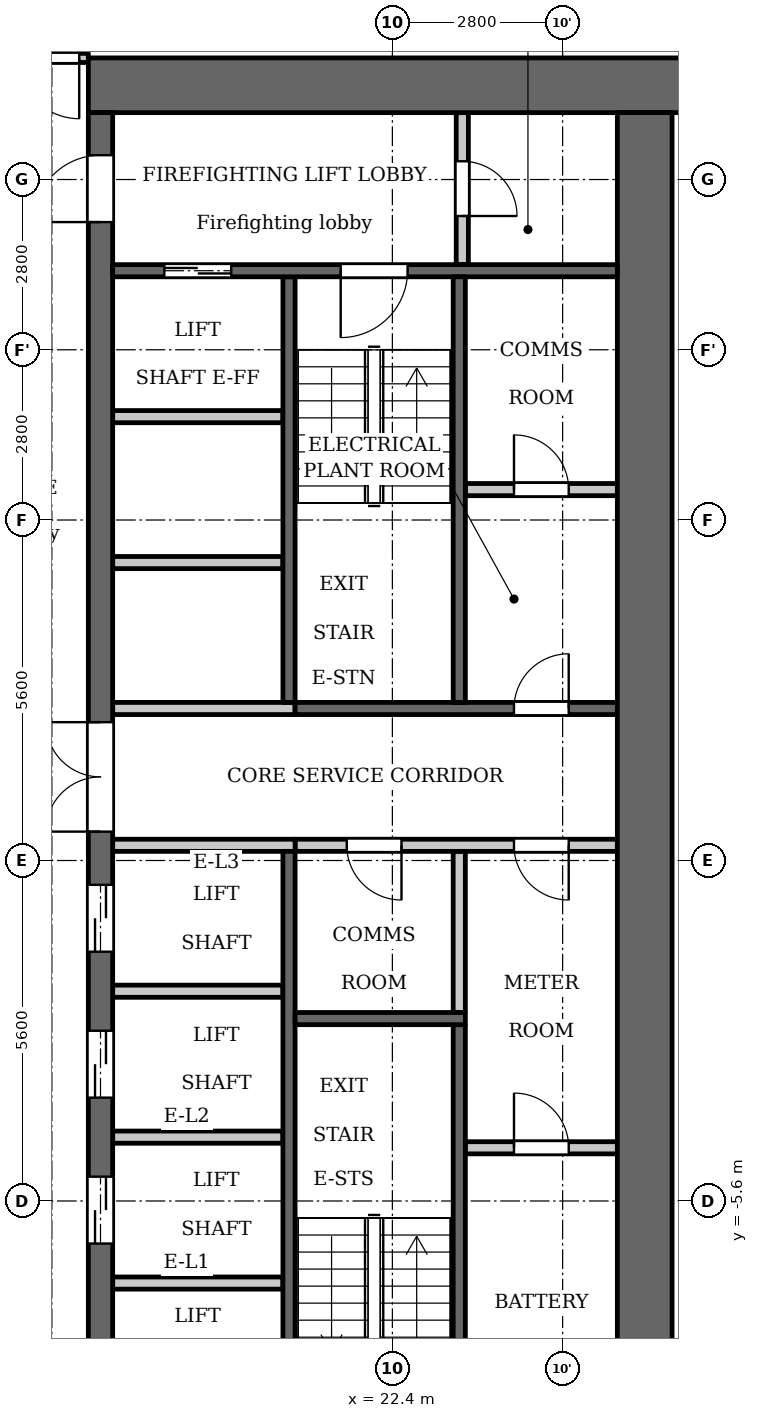
"""IFC4 building model, lengths in metres.
Left out: names, types, materials, properties, quantities, classifications, styles, units other than length and angle.
Written with IfcOpenShell. Run it as: python <this file> out.ifc"""

import sys

from ifc_helpers import new_model, si_unit, direction, frame, frame_2d, origin, place, context, subcontext, project, spatial, rectangle, extrude, element, fill, save


model = new_model("IFC4")
c1 = context("Model", 3, precision=1e-05, world=origin(), true_north=direction((0.0, 1.0)))
c2 = subcontext(c1, "Body", "Model", "MODEL_VIEW")
j1 = project(units=[si_unit("LENGTHUNIT", "METRE"), si_unit("PLANEANGLEUNIT", "RADIAN")], contexts=[c1])
p1 = place(None, origin())
s1 = spatial("IfcSite", under=j1, at=p1, CompositionType="ELEMENT")
p2 = place(p1, origin())
s2 = spatial("IfcBuilding", under=s1, at=p2, CompositionType="ELEMENT")
p3 = place(p2, frame((0.0, 0.0, 121.8)))
s3 = spatial("IfcBuildingStorey", under=s2, at=p3, CompositionType="ELEMENT", Elevation=121.8)
p4 = place(p3, frame((23.5, -2.5, 0.0), z_axis=(0.0, 0.0, 1.0), x_axis=(0.0, 1.0, 0.0)))
e1 = element("IfcWall", 1, at=p4, inside=s3, PredefinedType="PARTITIONING", context=c2, shape_type="SweptSolid", body=[
    extrude(rectangle(XDim=2.65, YDim=0.2, at=frame_2d((1.325, 0.0))), origin(), (0.0, 0.0, 1.0), 3.15),
])
p5 = place(p3, frame((20.7, 2.6, 0.0), z_axis=(0.0, 0.0, 1.0), x_axis=(0.0, 1.0, 0.0)))
e2 = element("IfcWall", 2, at=p5, inside=s3, PredefinedType="SHEAR", context=c2, shape_type="SweptSolid", body=[
    extrude(rectangle(XDim=7.0, YDim=0.2, at=frame_2d((3.5, 0.0))), origin(), (0.0, 0.0, 1.0), 3.15),
])
p6 = place(p3, frame((20.7, -9.6, 0.0), z_axis=(0.0, 0.0, 1.0), x_axis=(0.0, 1.0, 0.0)))
e3 = element("IfcWall", 3, at=p6, inside=s3, PredefinedType="SHEAR", context=c2, shape_type="SweptSolid", body=[
    extrude(rectangle(XDim=9.75, YDim=0.2, at=frame_2d((4.875, 0.0))), origin(), (0.0, 0.0, 1.0), 3.15),
])
p7 = place(p3, frame((20.8, 2.5, 0.0), z_axis=(0.0, 0.0, 1.0), x_axis=(1.0, 0.0, 0.0)))
e4 = element("IfcWall", 4, at=p7, inside=s3, PredefinedType="SHEAR", context=c2, shape_type="SweptSolid", body=[
    extrude(rectangle(XDim=5.3, YDim=0.2, at=frame_2d((2.65, 0.0))), origin(), (0.0, 0.0, 1.0), 3.15),
])
p8 = place(p7, frame((3.6, 0.0, 0.0)))
e5 = element("IfcOpeningElement", 5, at=p8, cuts=e4, PredefinedType="OPENING", context=c2, shape_type="SweptSolid", body=[
    extrude(rectangle(XDim=0.9, YDim=2.1, at=frame_2d((0.45, 1.05))), frame((0.0, 0.11, 0.0), z_axis=(0.0, -1.0, 0.0), x_axis=(1.0, 0.0, 0.0)), (0.0, 0.0, 1.0), 0.22),
])
p9 = place(p3, frame((20.8, 0.25, 0.0), z_axis=(0.0, 0.0, 1.0), x_axis=(1.0, 0.0, 0.0)))
e6 = element("IfcWall", 6, at=p9, inside=s3, PredefinedType="PARTITIONING", context=c2, shape_type="SweptSolid", body=[
    extrude(rectangle(XDim=5.3, YDim=0.2, at=frame_2d((2.65, 0.0))), origin(), (0.0, 0.0, 1.0), 3.15),
])
p10 = place(p9, frame((0.85, 0.0, 0.0)))
e7 = element("IfcOpeningElement", 7, at=p10, cuts=e6, PredefinedType="OPENING", context=c2, shape_type="SweptSolid", body=[
    extrude(rectangle(XDim=0.9, YDim=2.1, at=frame_2d((0.45, 1.05))), frame((0.0, 0.11, 0.0), z_axis=(0.0, -1.0, 0.0), x_axis=(1.0, 0.0, 0.0)), (0.0, 0.0, 1.0), 0.22),
])
p11 = place(p9, frame((3.6, 0.0, 0.0)))
e8 = element("IfcOpeningElement", 8, at=p11, cuts=e6, PredefinedType="OPENING", context=c2, shape_type="SweptSolid", body=[
    extrude(rectangle(XDim=0.9, YDim=2.1, at=frame_2d((0.45, 1.05))), frame((0.0, 0.11, 0.0), z_axis=(0.0, -1.0, 0.0), x_axis=(1.0, 0.0, 0.0)), (0.0, 0.0, 1.0), 0.22),
])
p12 = place(p3, frame((17.4, 12.75, 0.0), z_axis=(0.0, 0.0, 1.0), x_axis=(1.0, 0.0, 0.0)))
e9 = element("IfcWall", 9, at=p12, inside=s3, PredefinedType="SHEAR", context=c2, shape_type="SweptSolid", body=[
    extrude(rectangle(XDim=10.4, YDim=0.9, at=frame_2d((5.2, 0.0))), origin(), (0.0, 0.0, 1.0), 3.15),
])
p13 = place(p3, frame((17.6, -12.3, 0.0), z_axis=(0.0, 0.0, 1.0), x_axis=(0.0, 1.0, 0.0)))
e10 = element("IfcWall", 10, at=p13, inside=s3, PredefinedType="SHEAR", context=c2, shape_type="SweptSolid", body=[
    extrude(rectangle(XDim=24.6, YDim=0.4, at=frame_2d((12.3, 0.0))), origin(), (0.0, 0.0, 1.0), 3.15),
])
p14 = place(p13, frame((6.0, 0.0, 0.0)))
e11 = element("IfcOpeningElement", 11, at=p14, cuts=e10, PredefinedType="OPENING", context=c2, shape_type="SweptSolid", body=[
    extrude(rectangle(XDim=1.1, YDim=2.1, at=frame_2d((0.55, 1.05))), frame((0.0, 0.21, 0.0), z_axis=(0.0, -1.0, 0.0), x_axis=(1.0, 0.0, 0.0)), (0.0, 0.0, 1.0), 0.42),
])
p15 = place(p13, frame((8.4, 0.0, 0.0)))
e12 = element("IfcOpeningElement", 12, at=p15, cuts=e10, PredefinedType="OPENING", context=c2, shape_type="SweptSolid", body=[
    extrude(rectangle(XDim=1.1, YDim=2.1, at=frame_2d((0.55, 1.05))), frame((0.0, 0.21, 0.0), z_axis=(0.0, -1.0, 0.0), x_axis=(1.0, 0.0, 0.0)), (0.0, 0.0, 1.0), 0.42),
])
p16 = place(p13, frame((10.8, 0.0, 0.0)))
e13 = element("IfcOpeningElement", 13, at=p16, cuts=e10, PredefinedType="OPENING", context=c2, shape_type="SweptSolid", body=[
    extrude(rectangle(XDim=1.1, YDim=2.1, at=frame_2d((0.55, 1.05))), frame((0.0, 0.21, 0.0), z_axis=(0.0, -1.0, 0.0), x_axis=(1.0, 0.0, 0.0)), (0.0, 0.0, 1.0), 0.42),
])
p17 = place(p13, frame((22.8, 0.0, 0.0)))
e14 = element("IfcOpeningElement", 14, at=p17, cuts=e10, PredefinedType="OPENING", context=c2, shape_type="SweptSolid", body=[
    extrude(rectangle(XDim=1.1, YDim=2.1, at=frame_2d((0.55, 1.05))), frame((0.0, 0.21, 0.0), z_axis=(0.0, -1.0, 0.0), x_axis=(1.0, 0.0, 0.0)), (0.0, 0.0, 1.0), 0.42),
])
p18 = place(p13, frame((0.7, 0.0, 0.0)))
e15 = element("IfcOpeningElement", 15, at=p18, cuts=e10, PredefinedType="OPENING", context=c2, shape_type="SweptSolid", body=[
    extrude(rectangle(XDim=1.1, YDim=2.1, at=frame_2d((0.55, 1.05))), frame((0.0, 0.21, 0.0), z_axis=(0.0, -1.0, 0.0), x_axis=(1.0, 0.0, 0.0)), (0.0, 0.0, 1.0), 0.42),
])
p19 = place(p13, frame((12.775, 0.0, 0.0)))
e16 = element("IfcOpeningElement", 16, at=p19, cuts=e10, PredefinedType="OPENING", context=c2, shape_type="SweptSolid", body=[
    extrude(rectangle(XDim=1.8, YDim=2.1, at=frame_2d((0.9, 1.05))), frame((0.0, 0.21, 0.0), z_axis=(0.0, -1.0, 0.0), x_axis=(1.0, 0.0, 0.0)), (0.0, 0.0, 1.0), 0.42),
])
p20 = place(p3, frame((26.55, -12.3, 0.0), z_axis=(0.0, 0.0, 1.0), x_axis=(0.0, 1.0, 0.0)))
e17 = element("IfcWall", 17, at=p20, inside=s3, PredefinedType="SHEAR", context=c2, shape_type="SweptSolid", body=[
    extrude(rectangle(XDim=24.6, YDim=0.9, at=frame_2d((12.3, 0.0))), origin(), (0.0, 0.0, 1.0), 3.15),
])
p21 = place(p3, frame((23.55, 9.8, 0.0), z_axis=(0.0, 0.0, 1.0), x_axis=(0.0, 1.0, 0.0)))
e18 = element("IfcWall", 18, at=p21, inside=s3, PredefinedType="PARTITIONING", context=c2, shape_type="SweptSolid", body=[
    extrude(rectangle(XDim=2.5, YDim=0.2, at=frame_2d((1.25, 0.0))), origin(), (0.0, 0.0, 1.0), 3.15),
])
p22 = place(p21, frame((0.8, 0.0, 0.0)))
e19 = element("IfcOpeningElement", 19, at=p22, cuts=e18, PredefinedType="OPENING", context=c2, shape_type="SweptSolid", body=[
    extrude(rectangle(XDim=0.9, YDim=2.1, at=frame_2d((0.45, 1.05))), frame((0.0, 0.11, 0.0), z_axis=(0.0, -1.0, 0.0), x_axis=(1.0, 0.0, 0.0)), (0.0, 0.0, 1.0), 0.22),
])
p23 = place(p3, frame((23.6, -4.725, 0.0), z_axis=(0.0, 0.0, 1.0), x_axis=(1.0, 0.0, 0.0)))
e20 = element("IfcWall", 20, at=p23, inside=s3, PredefinedType="PARTITIONING", context=c2, shape_type="SweptSolid", body=[
    extrude(rectangle(XDim=2.5, YDim=0.2, at=frame_2d((1.25, 0.0))), origin(), (0.0, 0.0, 1.0), 3.15),
])
p24 = place(p23, frame((0.8, 0.0, 0.0)))
e21 = element("IfcOpeningElement", 21, at=p24, cuts=e20, PredefinedType="OPENING", context=c2, shape_type="SweptSolid", body=[
    extrude(rectangle(XDim=0.9, YDim=2.1, at=frame_2d((0.45, 1.05))), frame((0.0, 0.11, 0.0), z_axis=(0.0, -1.0, 0.0), x_axis=(1.0, 0.0, 0.0)), (0.0, 0.0, 1.0), 0.22),
])
p25 = place(p3, frame((23.6, 6.1, 0.0), z_axis=(0.0, 0.0, 1.0), x_axis=(1.0, 0.0, 0.0)))
e22 = element("IfcWall", 22, at=p25, inside=s3, PredefinedType="PARTITIONING", context=c2, shape_type="SweptSolid", body=[
    extrude(rectangle(XDim=2.5, YDim=0.2, at=frame_2d((1.25, 0.0))), origin(), (0.0, 0.0, 1.0), 3.15),
])
p26 = place(p25, frame((0.8, 0.0, 0.0)))
e23 = element("IfcOpeningElement", 23, at=p26, cuts=e22, PredefinedType="OPENING", context=c2, shape_type="SweptSolid", body=[
    extrude(rectangle(XDim=0.9, YDim=2.1, at=frame_2d((0.45, 1.05))), frame((0.0, 0.11, 0.0), z_axis=(0.0, -1.0, 0.0), x_axis=(1.0, 0.0, 0.0)), (0.0, 0.0, 1.0), 0.22),
])
for number, where, z_axis, x_axis in (
    (24, (17.8, -6.95, 0.0), (0.0, 0.0, 1.0), (1.0, 0.0, 0.0)),
    (25, (17.8, -4.55, 0.0), (0.0, 0.0, 1.0), (1.0, 0.0, 0.0)),
    (26, (17.8, -2.15, 0.0), (0.0, 0.0, 1.0), (1.0, 0.0, 0.0)),
):
    element("IfcWall", number, at=place(p3, frame(where, z_axis=z_axis, x_axis=x_axis)), inside=s3, PredefinedType="PARTITIONING", context=c2, shape_type="SweptSolid", body=[
        extrude(rectangle(XDim=2.8, YDim=0.2, at=frame_2d((1.4, 0.0))), origin(), (0.0, 0.0, 1.0), 3.15),
    ])
for number, where, z_axis, x_axis in (
    (27, (17.8, 0.25, 0.0), (0.0, 0.0, 1.0), (1.0, 0.0, 0.0)),
    (28, (17.8, 2.5, 0.0), (0.0, 0.0, 1.0), (1.0, 0.0, 0.0)),
):
    element("IfcWall", number, at=place(p3, frame(where, z_axis=z_axis, x_axis=x_axis)), inside=s3, PredefinedType="PARTITIONING", context=c2, shape_type="SweptSolid", body=[
        extrude(rectangle(XDim=3.0, YDim=0.2, at=frame_2d((1.5, 0.0))), origin(), (0.0, 0.0, 1.0), 3.15),
    ])
for number, where, z_axis, x_axis in (
    (29, (17.8, 4.9, 0.0), (0.0, 0.0, 1.0), (1.0, 0.0, 0.0)),
    (30, (17.8, 7.3, 0.0), (0.0, 0.0, 1.0), (1.0, 0.0, 0.0)),
):
    element("IfcWall", number, at=place(p3, frame(where, z_axis=z_axis, x_axis=x_axis)), inside=s3, PredefinedType="PARTITIONING", context=c2, shape_type="SweptSolid", body=[
        extrude(rectangle(XDim=2.8, YDim=0.2, at=frame_2d((1.4, 0.0))), origin(), (0.0, 0.0, 1.0), 3.15),
    ])
p27 = place(p3, frame((17.8, 9.7, 0.0), z_axis=(0.0, 0.0, 1.0), x_axis=(1.0, 0.0, 0.0)))
e31 = element("IfcWall", 31, at=p27, inside=s3, PredefinedType="SHEAR", context=c2, shape_type="SweptSolid", body=[
    extrude(rectangle(XDim=8.3, YDim=0.2, at=frame_2d((4.15, 0.0))), origin(), (0.0, 0.0, 1.0), 3.15),
])
p28 = place(p27, frame((0.85, 0.0, 0.0)))
e32 = element("IfcOpeningElement", 32, at=p28, cuts=e31, PredefinedType="OPENING", context=c2, shape_type="SweptSolid", body=[
    extrude(rectangle(XDim=1.1, YDim=2.1, at=frame_2d((0.55, 1.05))), frame((0.0, 0.11, 0.0), z_axis=(0.0, -1.0, 0.0), x_axis=(1.0, 0.0, 0.0)), (0.0, 0.0, 1.0), 0.22),
])
p29 = place(p27, frame((3.75, 0.0, 0.0)))
e33 = element("IfcOpeningElement", 33, at=p29, cuts=e31, PredefinedType="OPENING", context=c2, shape_type="SweptSolid", body=[
    extrude(rectangle(XDim=1.1, YDim=2.1, at=frame_2d((0.55, 1.05))), frame((0.0, 0.11, 0.0), z_axis=(0.0, -1.0, 0.0), x_axis=(1.0, 0.0, 0.0)), (0.0, 0.0, 1.0), 0.22),
])
p30 = place(p3, frame((23.5, 2.6, 0.0), z_axis=(0.0, 0.0, 1.0), x_axis=(0.0, 1.0, 0.0)))
e34 = element("IfcWall", 34, at=p30, inside=s3, PredefinedType="SHEAR", context=c2, shape_type="SweptSolid", body=[
    extrude(rectangle(XDim=7.0, YDim=0.2, at=frame_2d((3.5, 0.0))), origin(), (0.0, 0.0, 1.0), 3.15),
])
p31 = place(p3, frame((23.5, -9.6, 0.0), z_axis=(0.0, 0.0, 1.0), x_axis=(0.0, 1.0, 0.0)))
e35 = element("IfcWall", 35, at=p31, inside=s3, PredefinedType="SHEAR", context=c2, shape_type="SweptSolid", body=[
    extrude(rectangle(XDim=6.9, YDim=0.2, at=frame_2d((3.45, 0.0))), origin(), (0.0, 0.0, 1.0), 3.15),
])
p32 = place(p3, frame((20.8, -2.6, 0.0), z_axis=(0.0, 0.0, 1.0), x_axis=(1.0, 0.0, 0.0)))
e36 = element("IfcWall", 36, at=p32, inside=s3, PredefinedType="SHEAR", context=c2, shape_type="SweptSolid", body=[
    extrude(rectangle(XDim=2.8, YDim=0.2, at=frame_2d((1.4, 0.0))), origin(), (0.0, 0.0, 1.0), 3.15),
])
p33 = place(p3, frame((-17.4, 13.2, 0.0), z_axis=(0.0, 0.0, 1.0), x_axis=(1.0, 0.0, 0.0)))
e37 = element("IfcWall", 37, at=p33, inside=s3, PredefinedType="PARTITIONING", context=c2, shape_type="SweptSolid", body=[
    extrude(rectangle(XDim=34.8, YDim=0.15, at=frame_2d((17.4, 0.0))), origin(), (0.0, 0.0, 1.0), 3.15),
])
p34 = place(p33, frame((0.25, 0.0, 0.0)))
e38 = element("IfcOpeningElement", 38, at=p34, cuts=e37, PredefinedType="OPENING", context=c2, shape_type="SweptSolid", body=[
    extrude(rectangle(XDim=1.0, YDim=2.1, at=frame_2d((0.5, 1.05))), frame((0.0, 0.085, 0.0), z_axis=(0.0, -1.0, 0.0), x_axis=(1.0, 0.0, 0.0)), (0.0, 0.0, 1.0), 0.17),
])
p35 = place(p33, frame((33.65, 0.0, 0.0)))
e39 = element("IfcOpeningElement", 39, at=p35, cuts=e37, PredefinedType="OPENING", context=c2, shape_type="SweptSolid", body=[
    extrude(rectangle(XDim=1.0, YDim=2.1, at=frame_2d((0.5, 1.05))), frame((0.0, 0.085, 0.0), z_axis=(0.0, -1.0, 0.0), x_axis=(1.0, 0.0, 0.0)), (0.0, 0.0, 1.0), 0.17),
])
p36 = place(p33, frame((15.75, 0.0, 0.0)))
e40 = element("IfcOpeningElement", 40, at=p36, cuts=e37, PredefinedType="OPENING", context=c2, shape_type="SweptSolid", body=[
    extrude(rectangle(XDim=1.0, YDim=2.1, at=frame_2d((0.5, 1.05))), frame((0.0, 0.085, 0.0), z_axis=(0.0, -1.0, 0.0), x_axis=(1.0, 0.0, 0.0)), (0.0, 0.0, 1.0), 0.17),
])
p37 = place(p33, frame((18.1, 0.0, 0.0)))
e41 = element("IfcOpeningElement", 41, at=p37, cuts=e37, PredefinedType="OPENING", context=c2, shape_type="SweptSolid", body=[
    extrude(rectangle(XDim=1.0, YDim=2.1, at=frame_2d((0.5, 1.05))), frame((0.0, 0.085, 0.0), z_axis=(0.0, -1.0, 0.0), x_axis=(1.0, 0.0, 0.0)), (0.0, 0.0, 1.0), 0.17),
])
p38 = place(p33, frame((23.55, 0.0, 0.0)))
e42 = element("IfcOpeningElement", 42, at=p38, cuts=e37, PredefinedType="OPENING", context=c2, shape_type="SweptSolid", body=[
    extrude(rectangle(XDim=1.0, YDim=2.1, at=frame_2d((0.5, 1.05))), frame((0.0, 0.085, 0.0), z_axis=(0.0, -1.0, 0.0), x_axis=(1.0, 0.0, 0.0)), (0.0, 0.0, 1.0), 0.17),
])
p39 = place(p14, origin())
e43 = element("IfcDoor", 43, at=p39, inside=s3, OperationType="DOUBLE_DOOR_SLIDING", PredefinedType="DOOR", context=c2, shape_type="SweptSolid", body=[
    extrude(rectangle(XDim=1.1, YDim=2.1, at=frame_2d((0.55, 1.05))), frame((0.0, 0.025, 0.0), z_axis=(0.0, -1.0, 0.0), x_axis=(1.0, 0.0, 0.0)), (0.0, 0.0, 1.0), 0.05),
])
fill(e11, e43)
p40 = place(p15, origin())
e44 = element("IfcDoor", 44, at=p40, inside=s3, OperationType="DOUBLE_DOOR_SLIDING", PredefinedType="DOOR", context=c2, shape_type="SweptSolid", body=[
    extrude(rectangle(XDim=1.1, YDim=2.1, at=frame_2d((0.55, 1.05))), frame((0.0, 0.025, 0.0), z_axis=(0.0, -1.0, 0.0), x_axis=(1.0, 0.0, 0.0)), (0.0, 0.0, 1.0), 0.05),
])
fill(e12, e44)
p41 = place(p16, origin())
e45 = element("IfcDoor", 45, at=p41, inside=s3, OperationType="DOUBLE_DOOR_SLIDING", PredefinedType="DOOR", context=c2, shape_type="SweptSolid", body=[
    extrude(rectangle(XDim=1.1, YDim=2.1, at=frame_2d((0.55, 1.05))), frame((0.0, 0.025, 0.0), z_axis=(0.0, -1.0, 0.0), x_axis=(1.0, 0.0, 0.0)), (0.0, 0.0, 1.0), 0.05),
])
fill(e13, e45)
p42 = place(p28, origin())
e46 = element("IfcDoor", 46, at=p42, inside=s3, OperationType="DOUBLE_DOOR_SLIDING", PredefinedType="DOOR", context=c2, shape_type="SweptSolid", body=[
    extrude(rectangle(XDim=1.1, YDim=2.1, at=frame_2d((0.55, 1.05))), frame((0.0, 0.025, 0.0), z_axis=(0.0, -1.0, 0.0), x_axis=(1.0, 0.0, 0.0)), (0.0, 0.0, 1.0), 0.05),
])
fill(e32, e46)
p43 = place(p17, origin())
e47 = element("IfcDoor", 47, at=p43, inside=s3, OperationType="SINGLE_SWING_RIGHT", PredefinedType="DOOR", context=c2, shape_type="SweptSolid", body=[
    extrude(rectangle(XDim=1.1, YDim=2.1, at=frame_2d((0.55, 1.05))), frame((0.0, 0.025, 0.0), z_axis=(0.0, -1.0, 0.0), x_axis=(1.0, 0.0, 0.0)), (0.0, 0.0, 1.0), 0.05),
])
fill(e14, e47)
p44 = place(p22, origin())
e48 = element("IfcDoor", 48, at=p44, inside=s3, OperationType="SINGLE_SWING_LEFT", PredefinedType="DOOR", context=c2, shape_type="SweptSolid", body=[
    extrude(rectangle(XDim=0.9, YDim=2.1, at=frame_2d((0.45, 1.05))), frame((0.0, 0.025, 0.0), z_axis=(0.0, -1.0, 0.0), x_axis=(1.0, 0.0, 0.0)), (0.0, 0.0, 1.0), 0.05),
])
fill(e19, e48)
p45 = place(p29, origin())
e49 = element("IfcDoor", 49, at=p45, inside=s3, OperationType="SINGLE_SWING_LEFT", PredefinedType="DOOR", context=c2, shape_type="SweptSolid", body=[
    extrude(rectangle(XDim=1.1, YDim=2.1, at=frame_2d((0.55, 1.05))), frame((0.0, 0.025, 0.0), z_axis=(0.0, -1.0, 0.0), x_axis=(1.0, 0.0, 0.0)), (0.0, 0.0, 1.0), 0.05),
])
fill(e33, e49)
p46 = place(p19, origin())
e50 = element("IfcDoor", 50, at=p46, inside=s3, OperationType="DOUBLE_DOOR_SINGLE_SWING", PredefinedType="DOOR", context=c2, shape_type="SweptSolid", body=[
    extrude(rectangle(XDim=1.8, YDim=2.1, at=frame_2d((0.9, 1.05))), frame((0.0, 0.025, 0.0), z_axis=(0.0, -1.0, 0.0), x_axis=(1.0, 0.0, 0.0)), (0.0, 0.0, 1.0), 0.05),
])
fill(e16, e50)
p47 = place(p10, origin())
e51 = element("IfcDoor", 51, at=p47, inside=s3, OperationType="SINGLE_SWING_RIGHT", PredefinedType="DOOR", context=c2, shape_type="SweptSolid", body=[
    extrude(rectangle(XDim=0.9, YDim=2.1, at=frame_2d((0.45, 1.05))), frame((0.0, 0.025, 0.0), z_axis=(0.0, -1.0, 0.0), x_axis=(1.0, 0.0, 0.0)), (0.0, 0.0, 1.0), 0.05),
])
fill(e7, e51)
p48 = place(p24, origin())
e52 = element("IfcDoor", 52, at=p48, inside=s3, OperationType="SINGLE_SWING_RIGHT", PredefinedType="DOOR", context=c2, shape_type="SweptSolid", body=[
    extrude(rectangle(XDim=0.9, YDim=2.1, at=frame_2d((0.45, 1.05))), frame((0.0, 0.025, 0.0), z_axis=(0.0, -1.0, 0.0), x_axis=(1.0, 0.0, 0.0)), (0.0, 0.0, 1.0), 0.05),
])
fill(e21, e52)
p49 = place(p11, origin())
e53 = element("IfcDoor", 53, at=p49, inside=s3, OperationType="SINGLE_SWING_RIGHT", PredefinedType="DOOR", context=c2, shape_type="SweptSolid", body=[
    extrude(rectangle(XDim=0.9, YDim=2.1, at=frame_2d((0.45, 1.05))), frame((0.0, 0.025, 0.0), z_axis=(0.0, -1.0, 0.0), x_axis=(1.0, 0.0, 0.0)), (0.0, 0.0, 1.0), 0.05),
])
fill(e8, e53)
p50 = place(p26, origin())
e54 = element("IfcDoor", 54, at=p50, inside=s3, OperationType="SINGLE_SWING_RIGHT", PredefinedType="DOOR", context=c2, shape_type="SweptSolid", body=[
    extrude(rectangle(XDim=0.9, YDim=2.1, at=frame_2d((0.45, 1.05))), frame((0.0, 0.025, 0.0), z_axis=(0.0, -1.0, 0.0), x_axis=(1.0, 0.0, 0.0)), (0.0, 0.0, 1.0), 0.05),
])
fill(e23, e54)
p51 = place(p8, origin())
e55 = element("IfcDoor", 55, at=p51, inside=s3, OperationType="SINGLE_SWING_LEFT", PredefinedType="DOOR", context=c2, shape_type="SweptSolid", body=[
    extrude(rectangle(XDim=0.9, YDim=2.1, at=frame_2d((0.45, 1.05))), frame((0.0, 0.025, 0.0), z_axis=(0.0, -1.0, 0.0), x_axis=(1.0, 0.0, 0.0)), (0.0, 0.0, 1.0), 0.05),
])
fill(e5, e55)
p52 = place(p35, origin())
e56 = element("IfcDoor", 56, at=p52, inside=s3, OperationType="SINGLE_SWING_RIGHT", PredefinedType="DOOR", context=c2, shape_type="SweptSolid", body=[
    extrude(rectangle(XDim=1.0, YDim=2.1, at=frame_2d((0.5, 1.05))), frame((0.0, 0.025, 0.0), z_axis=(0.0, -1.0, 0.0), x_axis=(1.0, 0.0, 0.0)), (0.0, 0.0, 1.0), 0.05),
])
fill(e39, e56)
save(model, sys.argv[1])
